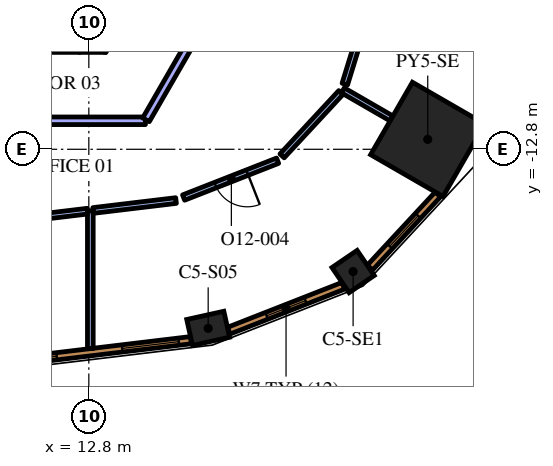
"""IFC4 building model, lengths in metres.
Left out: names, types, materials, properties, quantities, classifications, styles, units other than length and angle.
Written with IfcOpenShell. Run it as: python <this file> out.ifc"""

import sys

from ifc_helpers import new_model, si_unit, direction, frame, frame_2d, origin, origin_2d, place, context, subcontext, project, spatial, rectangle, extrude, element, fill, save


model = new_model("IFC4")
c1 = context("Model", 3, precision=1e-05, world=origin(), true_north=direction((0.0, 1.0)))
c2 = subcontext(c1, "Body", "Model", "MODEL_VIEW")
j1 = project(units=[si_unit("LENGTHUNIT", "METRE"), si_unit("PLANEANGLEUNIT", "RADIAN")], contexts=[c1])
p1 = place(None, origin())
s1 = spatial("IfcSite", under=j1, at=p1, CompositionType="ELEMENT")
p2 = place(p1, origin())
s2 = spatial("IfcBuilding", under=s1, at=p2, CompositionType="ELEMENT")
p3 = place(p2, frame((0.0, 0.0, 279.6)))
s3 = spatial("IfcBuildingStorey", under=s2, at=p3, CompositionType="ELEMENT", Elevation=279.6)
p4 = place(p3, frame((21.718, -12.539, 0.0), z_axis=(0.0, 0.0, 1.0), x_axis=(0.866025403784, -0.5, 0.0)))
e1 = element("IfcColumn", 1, at=p4, inside=s3, PredefinedType="COLUMN", context=c2, shape_type="SweptSolid", body=[
    extrude(rectangle(XDim=2.2, YDim=2.2, at=origin_2d()), origin(), (0.0, 0.0, 1.0), 4.2),
])
p5 = place(p3, frame((15.941, -17.512, 0.0), z_axis=(0.0, 0.0, 1.0), x_axis=(0.976233636503, 0.216720758026, 0.0)))
e2 = element("IfcColumn", 2, at=p5, inside=s3, PredefinedType="COLUMN", context=c2, shape_type="SweptSolid", body=[
    extrude(rectangle(XDim=1.0, YDim=0.7, at=origin_2d()), origin(), (0.0, 0.0, 1.0), 4.2),
])
p6 = place(p3, frame((19.754, -16.017, 0.0), z_axis=(0.0, 0.0, 1.0), x_axis=(0.826362775296, 0.563138139008, 0.0)))
e3 = element("IfcColumn", 3, at=p6, inside=s3, PredefinedType="COLUMN", context=c2, shape_type="SweptSolid", body=[
    extrude(rectangle(XDim=0.8, YDim=0.8, at=origin_2d()), origin(), (0.0, 0.0, 1.0), 4.2),
])
p7 = place(p3, frame((12.987, -10.106, 0.0), z_axis=(0.0, 0.0, 1.0), x_axis=(0.499950938802, 0.866053727428, 0.0)))
e4 = element("IfcWall", 4, at=p7, inside=s3, PredefinedType="SOLIDWALL", context=c2, shape_type="SweptSolid", body=[
    extrude(rectangle(XDim=3.823, YDim=0.6, at=frame_2d((1.912, 0.0))), origin(), (0.0, 0.0, 1.0), 4.2),
])
p8 = place(p3, frame((12.839, -14.419, 0.0), z_axis=(0.0, 0.0, 1.0), x_axis=(0.0, -1.0, 0.0)))
e5 = element("IfcWall", 5, at=p8, inside=s3, PredefinedType="PARTITIONING", context=c2, shape_type="SweptSolid", body=[
    extrude(rectangle(XDim=3.626, YDim=0.15, at=frame_2d((1.813, 0.0))), origin(), (0.0, 0.0, 1.0), 3.55),
])
p9 = place(p3, frame((9.492, -14.82, 0.0), z_axis=(0.0, 0.0, 1.0), x_axis=(0.992887701721, 0.119054658757, 0.0)))
e6 = element("IfcWall", 6, at=p9, inside=s3, PredefinedType="PARTITIONING", context=c2, shape_type="SweptSolid", body=[
    extrude(rectangle(XDim=3.295, YDim=0.15, at=frame_2d((1.648, 0.0))), origin(), (0.0, 0.0, 1.0), 3.55),
])
p10 = place(p3, frame((19.485, -11.25, 0.0), z_axis=(0.0, 0.0, 1.0), x_axis=(0.866039857565, -0.499974964482, 0.0)))
e7 = element("IfcWall", 7, at=p10, inside=s3, PredefinedType="PARTITIONING", context=c2, shape_type="SweptSolid", body=[
    extrude(rectangle(XDim=1.479, YDim=0.15, at=frame_2d((0.739, 0.0))), origin(), (0.0, 0.0, 1.0), 3.55),
])
p11 = place(p3, frame((12.914, -14.41, 0.0), z_axis=(0.0, 0.0, 1.0), x_axis=(0.99288472801, 0.119079456181, 0.0)))
e8 = element("IfcWall", 8, at=p11, inside=s3, PredefinedType="PARTITIONING", context=c2, shape_type="SweptSolid", body=[
    extrude(rectangle(XDim=2.196, YDim=0.15, at=frame_2d((1.098, 0.0))), origin(), (0.0, 0.0, 1.0), 3.55),
])
p12 = place(p3, frame((17.767, -13.101, 0.0), z_axis=(0.0, 0.0, 1.0), x_axis=(-0.930971361221, -0.365092213812, 0.0)))
e9 = element("IfcWall", 9, at=p12, inside=s3, PredefinedType="PARTITIONING", context=c2, shape_type="SweptSolid", body=[
    extrude(rectangle(XDim=2.657, YDim=0.15, at=frame_2d((1.328, 0.0))), origin(), (0.0, 0.0, 1.0), 3.55),
])
p13 = place(p12, frame((0.857, 0.0, 0.0)))
e10 = element("IfcOpeningElement", 10, at=p13, cuts=e9, PredefinedType="OPENING", context=c2, shape_type="SweptSolid", body=[
    extrude(rectangle(XDim=0.9, YDim=2.1, at=frame_2d((0.45, 1.05))), frame((0.0, 0.085, 0.0), z_axis=(0.0, -1.0, 0.0), x_axis=(1.0, 0.0, 0.0)), (0.0, 0.0, 1.0), 0.17),
])
p14 = place(p3, frame((17.885, -12.974, 0.0), z_axis=(0.0, 0.0, 1.0), x_axis=(0.680220611996, 0.733007448132, 0.0)))
e11 = element("IfcWall", 11, at=p14, inside=s3, PredefinedType="PARTITIONING", context=c2, shape_type="SweptSolid", body=[
    extrude(rectangle(XDim=2.276, YDim=0.15, at=frame_2d((1.138, 0.0))), origin(), (0.0, 0.0, 1.0), 3.55),
])
p15 = place(p3, frame((19.536, -11.085, 0.0), z_axis=(0.0, 0.0, 1.0), x_axis=(0.294632751805, 0.955610559571, 0.0)))
e12 = element("IfcWall", 12, at=p15, inside=s3, PredefinedType="PARTITIONING", context=c2, shape_type="SweptSolid", body=[
    extrude(rectangle(XDim=2.353, YDim=0.15, at=frame_2d((1.176, 0.0))), origin(), (0.0, 0.0, 1.0), 3.55),
])
p16 = place(p3, frame((6.03, -12.05, 0.0), z_axis=(0.0, 0.0, 1.0), x_axis=(1.0, 0.0, 0.0)))
e13 = element("IfcWall", 13, at=p16, inside=s3, PredefinedType="PARTITIONING", context=c2, shape_type="SweptSolid", body=[
    extrude(rectangle(XDim=8.259, YDim=0.2, at=frame_2d((4.13, 0.0))), origin(), (0.0, 0.0, 1.0), 3.55),
])
p17 = place(p3, frame((14.304, -12.024, 0.0), z_axis=(0.0, 0.0, 1.0), x_axis=(0.500010613097, 0.866019276224, 0.0)))
e14 = element("IfcWall", 14, at=p17, inside=s3, PredefinedType="PARTITIONING", context=c2, shape_type="SweptSolid", body=[
    extrude(rectangle(XDim=6.552, YDim=0.2, at=frame_2d((3.276, 0.0))), origin(), (0.0, 0.0, 1.0), 3.55),
])
p18 = place(p3, frame((10.111, -18.468, 0.0), z_axis=(0.0, 0.0, 1.0), x_axis=(0.992885582795, 0.119072328769, 0.0)))
e15 = element("IfcWall", 15, at=p18, inside=s3, PredefinedType="SOLIDWALL", context=c2, shape_type="SweptSolid", body=[
    extrude(rectangle(XDim=5.415, YDim=0.19, at=frame_2d((2.708, 0.0))), origin(), (0.0, 0.0, 1.0), 3.95),
])
p19 = place(p18, frame((0.357, 0.0, 0.6)))
e16 = element("IfcOpeningElement", 16, at=p19, cuts=e15, PredefinedType="OPENING", context=c2, shape_type="SweptSolid", body=[
    extrude(rectangle(XDim=1.5, YDim=2.85, at=frame_2d((0.75, 1.425))), frame((0.0, 0.105, 0.0), z_axis=(0.0, -1.0, 0.0), x_axis=(1.0, 0.0, 0.0)), (0.0, 0.0, 1.0), 0.21),
])
p20 = place(p18, frame((3.593, 0.0, 0.6)))
e17 = element("IfcOpeningElement", 17, at=p20, cuts=e15, PredefinedType="OPENING", context=c2, shape_type="SweptSolid", body=[
    extrude(rectangle(XDim=1.5, YDim=2.85, at=frame_2d((0.75, 1.425))), frame((0.0, 0.105, 0.0), z_axis=(0.0, -1.0, 0.0), x_axis=(1.0, 0.0, 0.0)), (0.0, 0.0, 1.0), 0.21),
])
p21 = place(p3, frame((16.483, -17.573, 0.0), z_axis=(0.0, 0.0, 1.0), x_axis=(0.93100888477, 0.364996515709, 0.0)))
e18 = element("IfcWall", 18, at=p21, inside=s3, PredefinedType="SOLIDWALL", context=c2, shape_type="SweptSolid", body=[
    extrude(rectangle(XDim=3.237, YDim=0.19, at=frame_2d((1.618, 0.0))), origin(), (0.0, 0.0, 1.0), 3.95),
])
p22 = place(p21, frame((1.068, 0.0, 0.6)))
e19 = element("IfcOpeningElement", 19, at=p22, cuts=e18, PredefinedType="OPENING", context=c2, shape_type="SweptSolid", body=[
    extrude(rectangle(XDim=1.1, YDim=2.85, at=frame_2d((0.55, 1.425))), frame((0.0, 0.105, 0.0), z_axis=(0.0, -1.0, 0.0), x_axis=(1.0, 0.0, 0.0)), (0.0, 0.0, 1.0), 0.21),
])
p23 = place(p3, frame((20.198, -15.914, 0.0), z_axis=(0.0, 0.0, 1.0), x_axis=(0.680219354823, 0.733008614768, 0.0)))
e20 = element("IfcWall", 20, at=p23, inside=s3, PredefinedType="SOLIDWALL", context=c2, shape_type="SweptSolid", body=[
    extrude(rectangle(XDim=2.627, YDim=0.19, at=frame_2d((1.313, 0.0))), origin(), (0.0, 0.0, 1.0), 3.95),
])
p24 = place(p23, frame((0.763, 0.0, 0.6)))
e21 = element("IfcOpeningElement", 21, at=p24, cuts=e20, PredefinedType="OPENING", context=c2, shape_type="SweptSolid", body=[
    extrude(rectangle(XDim=1.1, YDim=2.85, at=frame_2d((0.55, 1.425))), frame((0.0, 0.105, 0.0), z_axis=(0.0, -1.0, 0.0), x_axis=(1.0, 0.0, 0.0)), (0.0, 0.0, 1.0), 0.21),
])
p25 = place(p13, origin())
e22 = element("IfcDoor", 22, at=p25, inside=s3, OperationType="SINGLE_SWING_LEFT", PredefinedType="DOOR", context=c2, shape_type="SweptSolid", body=[
    extrude(rectangle(XDim=0.9, YDim=2.1, at=frame_2d((0.45, 1.05))), frame((0.0, 0.025, 0.0), z_axis=(0.0, -1.0, 0.0), x_axis=(1.0, 0.0, 0.0)), (0.0, 0.0, 1.0), 0.05),
])
fill(e10, e22)
p26 = place(p19, origin())
e23 = element("IfcWindow", 23, at=p26, inside=s3, PartitioningType="SINGLE_PANEL", PredefinedType="WINDOW", context=c2, shape_type="SweptSolid", body=[
    extrude(rectangle(XDim=1.5, YDim=2.85, at=frame_2d((0.75, 1.425))), frame((0.0, 0.045, 0.0), z_axis=(0.0, -1.0, 0.0), x_axis=(1.0, 0.0, 0.0)), (0.0, 0.0, 1.0), 0.06),
])
fill(e16, e23)
p27 = place(p20, origin())
e24 = element("IfcWindow", 24, at=p27, inside=s3, PartitioningType="SINGLE_PANEL", PredefinedType="WINDOW", context=c2, shape_type="SweptSolid", body=[
    extrude(rectangle(XDim=1.5, YDim=2.85, at=frame_2d((0.75, 1.425))), frame((0.0, 0.045, 0.0), z_axis=(0.0, -1.0, 0.0), x_axis=(1.0, 0.0, 0.0)), (0.0, 0.0, 1.0), 0.06),
])
fill(e17, e24)
p28 = place(p22, origin())
e25 = element("IfcWindow", 25, at=p28, inside=s3, PartitioningType="SINGLE_PANEL", PredefinedType="WINDOW", context=c2, shape_type="SweptSolid", body=[
    extrude(rectangle(XDim=1.1, YDim=2.85, at=frame_2d((0.55, 1.425))), frame((0.0, 0.045, 0.0), z_axis=(0.0, -1.0, 0.0), x_axis=(1.0, 0.0, 0.0)), (0.0, 0.0, 1.0), 0.06),
])
fill(e19, e25)
p29 = place(p24, origin())
e26 = element("IfcWindow", 26, at=p29, inside=s3, PartitioningType="SINGLE_PANEL", PredefinedType="WINDOW", context=c2, shape_type="SweptSolid", body=[
    extrude(rectangle(XDim=1.1, YDim=2.85, at=frame_2d((0.55, 1.425))), frame((0.0, 0.045, 0.0), z_axis=(0.0, -1.0, 0.0), x_axis=(1.0, 0.0, 0.0)), (0.0, 0.0, 1.0), 0.06),
])
fill(e21, e26)
save(model, sys.argv[1])
